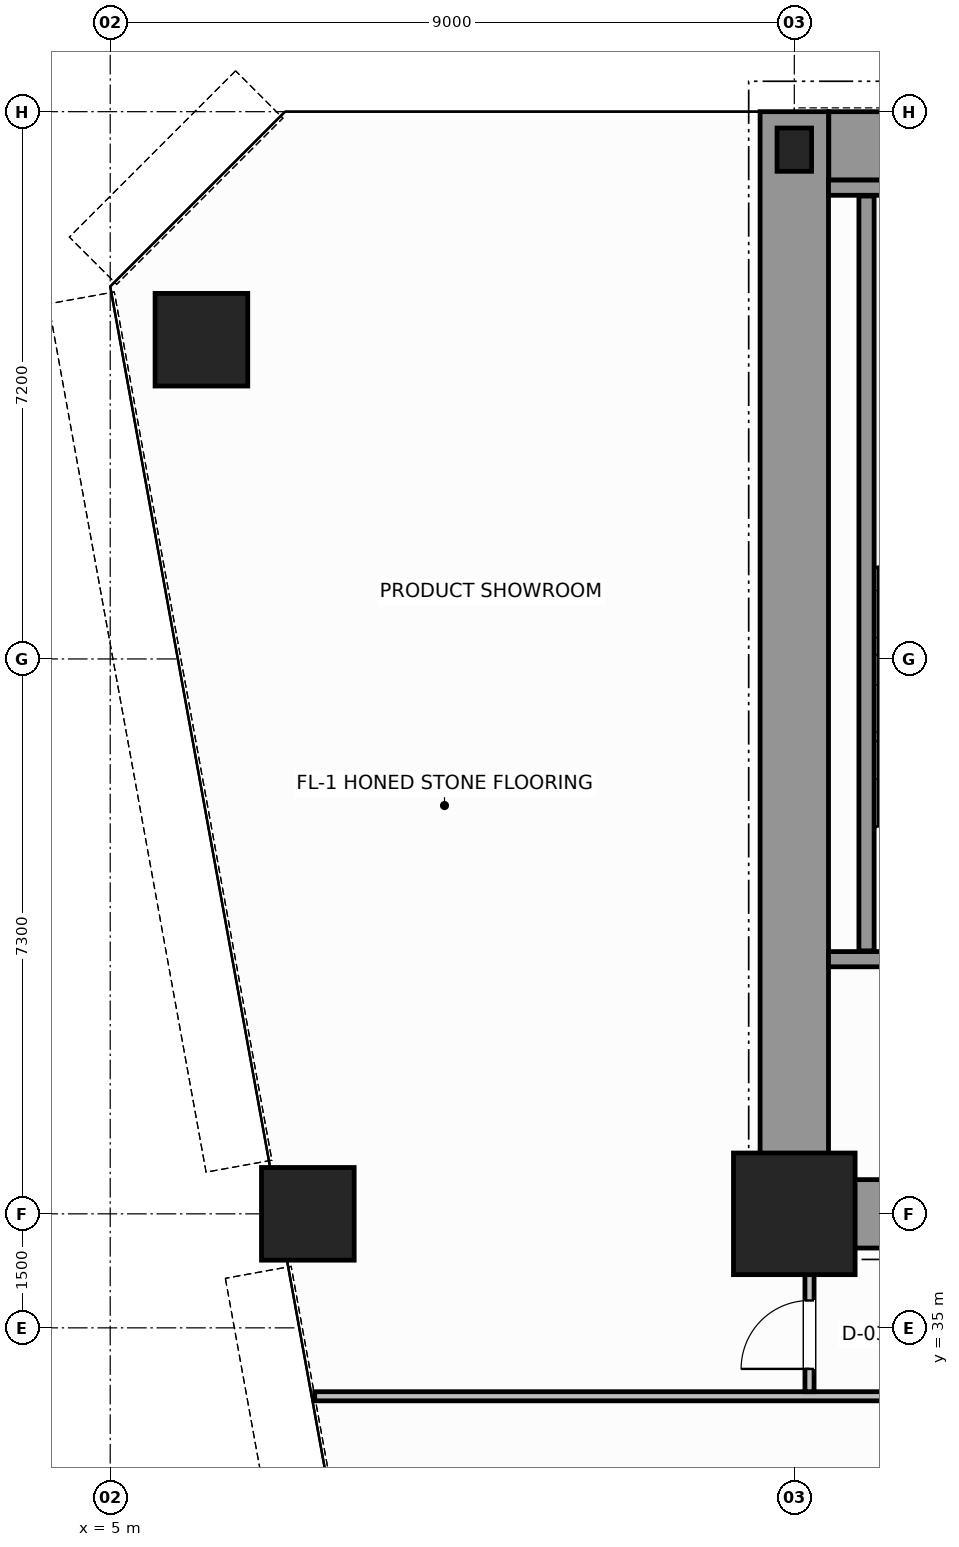
"""IFC4 building model, lengths in metres.
Left out: names, types, materials, properties, quantities, classifications, styles, units other than length and angle.
Written with IfcOpenShell. Run it as: python <this file> out.ifc"""

import sys

from ifc_helpers import new_model, si_unit, direction, frame, frame_2d, origin, origin_2d, place, context, subcontext, project, spatial, rectangle, hollow_circle, i_section, extrude, source, transform, mapped, element, fill, save


model = new_model("IFC4")
c1 = context("Model", 3, precision=1e-05, world=origin(), true_north=direction((0.0, 1.0)))
c2 = subcontext(c1, "Body", "Model", "MODEL_VIEW")
j1 = project(units=[si_unit("LENGTHUNIT", "METRE"), si_unit("PLANEANGLEUNIT", "RADIAN")], contexts=[c1])
p1 = place(None, origin())
s1 = spatial("IfcSite", under=j1, at=p1, CompositionType="ELEMENT")
p2 = place(p1, origin())
s2 = spatial("IfcBuilding", under=s1, at=p2, CompositionType="ELEMENT")
p3 = place(p2, frame((0.0, 0.0, 26.4)))
s3 = spatial("IfcBuildingStorey", under=s2, at=p3, CompositionType="ELEMENT", Elevation=26.4)
m1 = source(origin(), c2, "Body", "SweptSolid", [
    extrude(rectangle(XDim=1.6, YDim=1.6, at=origin_2d()), origin(), (0.0, 0.0, 1.0), 3.8),
])
p4 = place(p3, frame((14.0, 36.5, 0.0), z_axis=(0.0, 0.0, 1.0), x_axis=(1.0, 0.0, 0.0)))
e1 = element("IfcColumn", 1, at=p4, inside=s3, PredefinedType="COLUMN", context=c2, shape_type="MappedRepresentation", body=[
    mapped(m1, transform((0.0, 0.0, 0.0), scale=1.0)),
])
m2 = source(origin(), c2, "Body", "SweptSolid", [
    extrude(i_section(OverallWidth=0.454, OverallDepth=0.569, WebThickness=0.078, FlangeThickness=0.08, FilletRadius=0.015, at=origin_2d()), origin(), (0.0, 0.0, 1.0), 3.8),
])
p5 = place(p3, frame((14.0, 50.5, 0.0), z_axis=(0.0, 0.0, 1.0), x_axis=(1.0, 0.0, 0.0)))
e2 = element("IfcColumn", 2, at=p5, inside=s3, PredefinedType="COLUMN", context=c2, shape_type="MappedRepresentation", body=[
    mapped(m2, transform((0.0, 0.0, 0.0), scale=1.0)),
])
m3 = source(origin(), c2, "Body", "SweptSolid", [
    extrude(hollow_circle(Radius=0.61, WallThickness=0.05, at=origin_2d()), origin(), (0.0, 0.0, 1.0), 3.8),
])
for number, where, z_axis, x_axis in (
    (3, (6.2, 48.0, 0.0), (0.0, 0.0, 1.0), (1.0, 0.0, 0.0)),
    (4, (7.6, 36.5, 0.0), (0.0, 0.0, 1.0), (1.0, 0.0, 0.0)),
):
    element("IfcColumn", number, at=place(p3, frame(where, z_axis=z_axis, x_axis=x_axis)), inside=s3, PredefinedType="COLUMN", context=c2, shape_type="MappedRepresentation", body=[
        mapped(m3, transform((0.0, 0.0, 0.0), scale=1.0)),
    ])
p6 = place(p3, frame((14.454, 50.55, 0.0), z_axis=(0.0, 0.0, 1.0), x_axis=(1.0, 0.0, 0.0)))
e5 = element("IfcWall", 5, at=p6, inside=s3, PredefinedType="SHEAR", context=c2, shape_type="SweptSolid", body=[
    extrude(rectangle(XDim=19.544, YDim=0.9, at=frame_2d((9.772, 0.0))), origin(), (0.0, 0.0, 1.0), 3.8),
])
p7 = place(p3, frame((14.0, 36.5, 0.0), z_axis=(0.0, 0.0, 1.0), x_axis=(0.0, 1.0, 0.0)))
e6 = element("IfcWall", 6, at=p7, inside=s3, PredefinedType="SHEAR", context=c2, shape_type="SweptSolid", body=[
    extrude(rectangle(XDim=14.5, YDim=0.9, at=frame_2d((7.25, 0.0))), origin(), (0.0, 0.0, 1.0), 3.8),
])
p8 = place(p3, frame((14.47, 36.5, 0.0), z_axis=(0.0, 0.0, 1.0), x_axis=(1.0, 0.0, 0.0)))
e7 = element("IfcWall", 7, at=p8, inside=s3, PredefinedType="SHEAR", context=c2, shape_type="SweptSolid", body=[
    extrude(rectangle(XDim=3.73, YDim=0.9, at=frame_2d((1.865, 0.0))), origin(), (0.0, 0.0, 1.0), 2.38),
])
p9 = place(p3, frame((14.45, 39.85, 0.0), z_axis=(0.0, 0.0, 1.0), x_axis=(1.0, 0.0, 0.0)))
e8 = element("IfcWall", 8, at=p9, inside=s3, PredefinedType="SOLIDWALL", context=c2, shape_type="SweptSolid", body=[
    extrude(rectangle(XDim=4.15, YDim=0.2, at=frame_2d((2.075, 0.0))), origin(), (0.0, 0.0, 1.0), 3.8),
])
p10 = place(p9, frame((1.725, 0.0, 0.0)))
e9 = element("IfcOpeningElement", 9, at=p10, cuts=e8, PredefinedType="OPENING", context=c2, shape_type="SweptSolid", body=[
    extrude(rectangle(XDim=1.1, YDim=2.15, at=frame_2d((0.55, 1.075))), frame((0.0, 0.11, 0.0), z_axis=(0.0, -1.0, 0.0), x_axis=(1.0, 0.0, 0.0)), (0.0, 0.0, 1.0), 0.22),
])
p11 = place(p3, frame((14.45, 50.0, 0.0), z_axis=(0.0, 0.0, 1.0), x_axis=(1.0, 0.0, 0.0)))
e10 = element("IfcWall", 10, at=p11, inside=s3, PredefinedType="SOLIDWALL", context=c2, shape_type="SweptSolid", body=[
    extrude(rectangle(XDim=4.15, YDim=0.2, at=frame_2d((2.075, 0.0))), origin(), (0.0, 0.0, 1.0), 3.8),
])
p12 = place(p3, frame((14.95, 39.96, 0.0), z_axis=(0.0, 0.0, 1.0), x_axis=(0.0, 1.0, 0.0)))
e11 = element("IfcWall", 11, at=p12, inside=s3, PredefinedType="SOLIDWALL", context=c2, shape_type="SweptSolid", body=[
    extrude(rectangle(XDim=9.93, YDim=0.2, at=frame_2d((4.965, 0.0))), origin(), (0.0, 0.0, 1.0), 3.8),
])
p13 = place(p3, frame((7.69, 34.1, 0.0), z_axis=(0.0, 0.0, 1.0), x_axis=(1.0, 0.0, 0.0)))
e12 = element("IfcWall", 12, at=p13, inside=s3, PredefinedType="PARTITIONING", context=c2, shape_type="SweptSolid", body=[
    extrude(rectangle(XDim=8.45, YDim=0.12, at=frame_2d((4.225, 0.0))), origin(), (0.0, 0.0, 1.0), 3.58),
])
p14 = place(p3, frame((14.2, 34.16, 0.0), z_axis=(0.0, 0.0, 1.0), x_axis=(0.0, 1.0, 0.0)))
e13 = element("IfcWall", 13, at=p14, inside=s3, PredefinedType="PARTITIONING", context=c2, shape_type="SweptSolid", body=[
    extrude(rectangle(XDim=2.28, YDim=0.12, at=frame_2d((1.14, 0.0))), origin(), (0.0, 0.0, 1.0), 3.58),
])
p15 = place(p14, frame((0.3, 0.0, 0.0)))
e14 = element("IfcOpeningElement", 14, at=p15, cuts=e13, PredefinedType="OPENING", context=c2, shape_type="SweptSolid", body=[
    extrude(rectangle(XDim=0.9, YDim=2.15, at=frame_2d((0.45, 1.075))), frame((0.0, 0.07, 0.0), z_axis=(0.0, -1.0, 0.0), x_axis=(1.0, 0.0, 0.0)), (0.0, 0.0, 1.0), 0.14),
])
m4 = source(origin(), c2, "Body", "SweptSolid", [
    extrude(rectangle(XDim=0.9, YDim=2.15, at=frame_2d((0.45, 1.075))), frame((0.0, 0.025, 0.0), z_axis=(0.0, -1.0, 0.0), x_axis=(1.0, 0.0, 0.0)), (0.0, 0.0, 1.0), 0.05),
])
p16 = place(p15, origin())
e15 = element("IfcDoor", 15, at=p16, inside=s3, OperationType="SINGLE_SWING_LEFT", PredefinedType="DOOR", context=c2, shape_type="MappedRepresentation", body=[
    mapped(m4, transform((0.0, 0.0, 0.0), scale=1.0)),
])
fill(e14, e15)
save(model, sys.argv[1])
